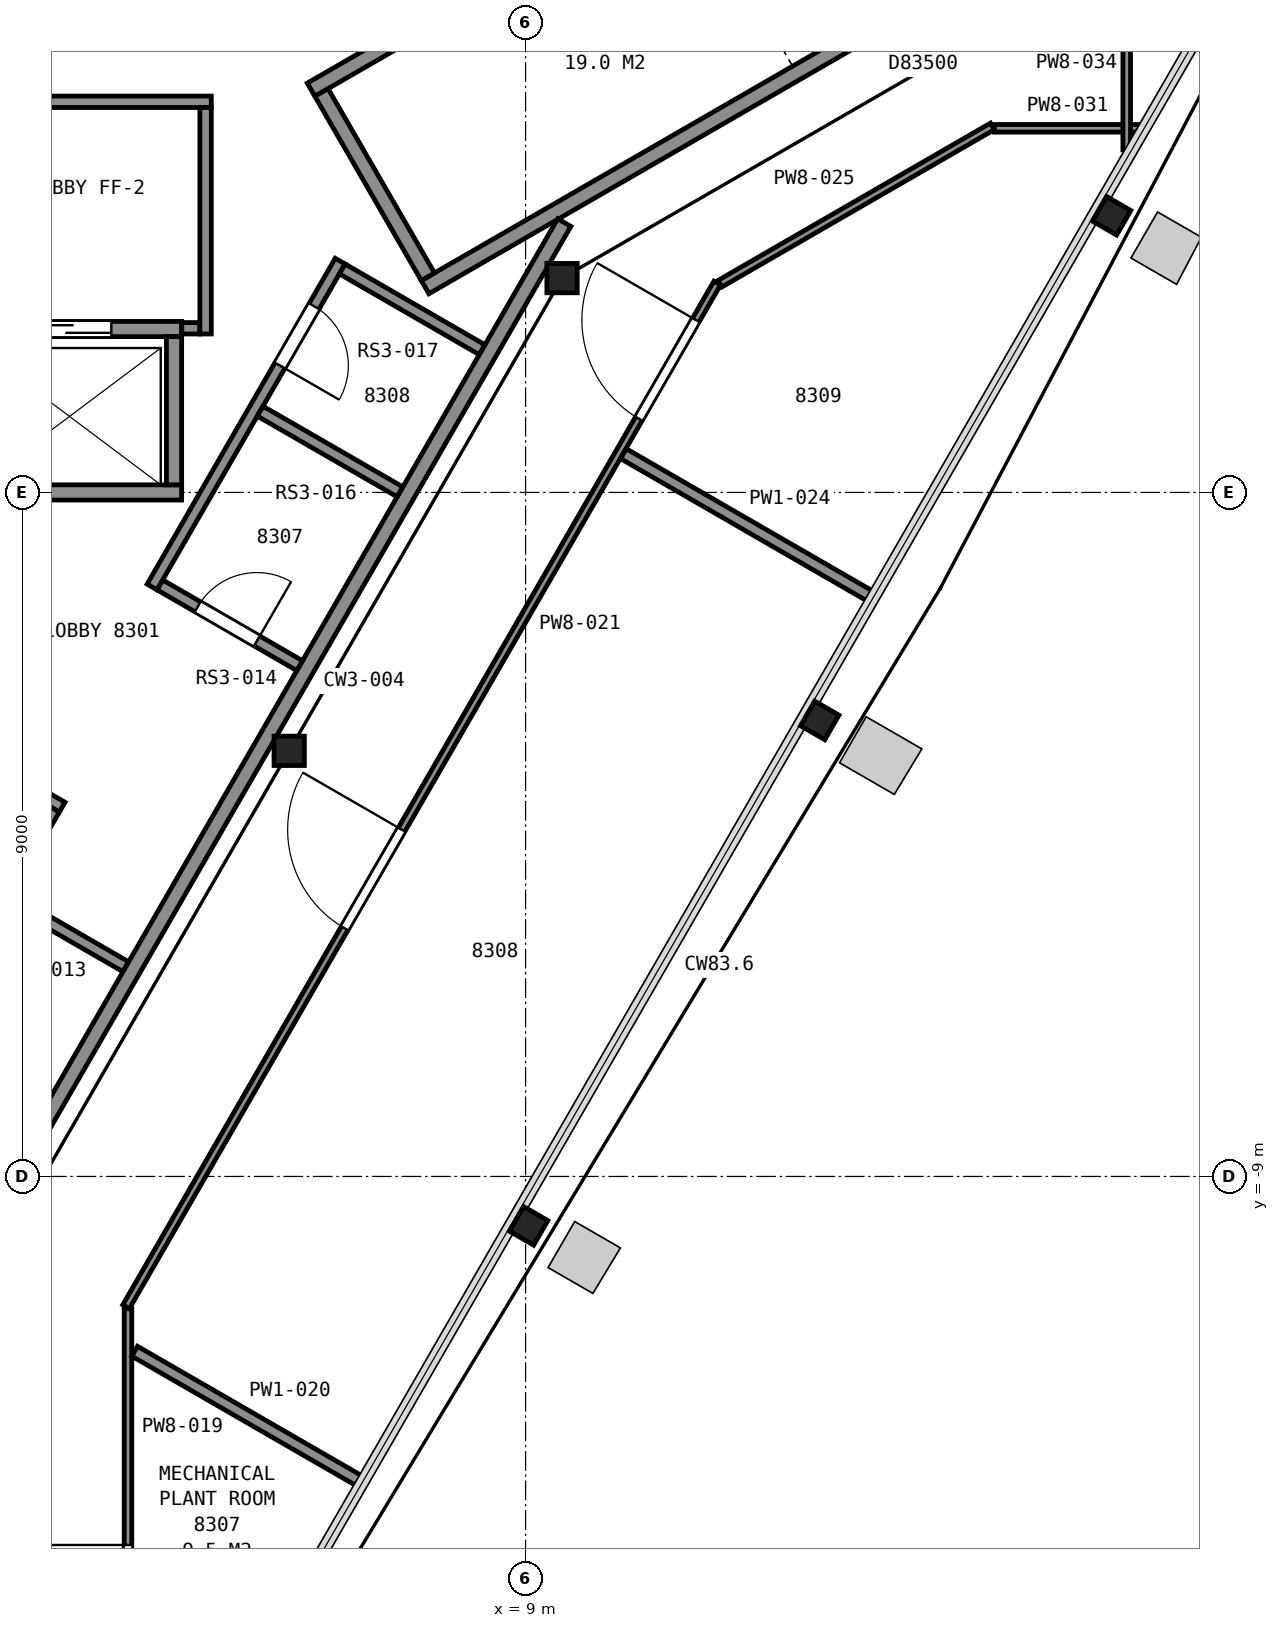
"""IFC4 building model, lengths in metres.
Left out: names, types, materials, properties, quantities, classifications, styles, units other than length and angle.
Written with IfcOpenShell. Run it as: python <this file> out.ifc"""

import sys

from ifc_helpers import new_model, si_unit, direction, frame, frame_2d, origin, origin_2d, place, context, subcontext, project, spatial, rectangle, i_section, extrude, element, fill, save


model = new_model("IFC4")
c1 = context("Model", 3, precision=1e-05, world=origin(), true_north=direction((0.0, 1.0)))
c2 = subcontext(c1, "Body", "Model", "MODEL_VIEW")
j1 = project(units=[si_unit("LENGTHUNIT", "METRE"), si_unit("PLANEANGLEUNIT", "RADIAN")], contexts=[c1])
p1 = place(None, origin())
s1 = spatial("IfcSite", under=j1, at=p1, CompositionType="ELEMENT")
p2 = place(p1, origin())
s2 = spatial("IfcBuilding", under=s1, at=p2, CompositionType="ELEMENT")
p3 = place(p2, frame((0.0, 0.0, 329.4)))
s3 = spatial("IfcBuildingStorey", under=s2, at=p3, CompositionType="ELEMENT", Elevation=329.4)
p4 = place(p3, frame((9.04, -9.65, 0.0), z_axis=(0.0, 0.0, 1.0), x_axis=(-0.5, -0.866025403784, 0.0)))
e1 = element("IfcColumn", 1, at=p4, inside=s3, PredefinedType="COLUMN", context=c2, shape_type="SweptSolid", body=[
    extrude(i_section(OverallWidth=0.373, OverallDepth=0.368, WebThickness=0.015, FlangeThickness=0.024, FilletRadius=0.015, at=origin_2d()), origin(), (0.0, 0.0, 1.0), 4.36),
])
p5 = place(p3, frame((12.87, -3.0, 0.0), z_axis=(0.0, 0.0, 1.0), x_axis=(-0.5, -0.866025403784, 0.0)))
e2 = element("IfcColumn", 2, at=p5, inside=s3, PredefinedType="COLUMN", context=c2, shape_type="SweptSolid", body=[
    extrude(i_section(OverallWidth=0.373, OverallDepth=0.368, WebThickness=0.015, FlangeThickness=0.024, FilletRadius=0.015, at=origin_2d()), origin(), (0.0, 0.0, 1.0), 4.6),
])
p6 = place(p3, frame((16.71, 3.64, 0.0), z_axis=(0.0, 0.0, 1.0), x_axis=(-0.5, -0.866025403784, 0.0)))
e3 = element("IfcColumn", 3, at=p6, inside=s3, PredefinedType="COLUMN", context=c2, shape_type="SweptSolid", body=[
    extrude(i_section(OverallWidth=0.373, OverallDepth=0.368, WebThickness=0.015, FlangeThickness=0.024, FilletRadius=0.015, at=origin_2d()), origin(), (0.0, 0.0, 1.0), 4.34),
])
for number, where, z_axis, x_axis in (
    (4, (9.48, 2.82, 0.0), (0.0, 0.0, 1.0), (1.0, 0.0, 0.0)),
    (5, (5.89, -3.4, 0.0), (0.0, 0.0, 1.0), (1.0, 0.0, 0.0)),
):
    element("IfcColumn", number, at=place(p3, frame(where, z_axis=z_axis, x_axis=x_axis)), inside=s3, PredefinedType="COLUMN", context=c2, shape_type="SweptSolid", body=[
        extrude(i_section(OverallWidth=0.399, OverallDepth=0.386, WebThickness=0.021, FlangeThickness=0.033, FilletRadius=0.015, at=origin_2d()), origin(), (0.0, 0.0, 1.0), 4.2),
    ])
for number, where, z_axis, x_axis in (
    (6, (6.178, 5.299, 0.0), (0.0, 0.0, 1.0), (0.866, 0.5, 0.0)),
    (7, (7.678, 2.701, 0.0), (0.0, 0.0, 1.0), (0.866, 0.5, 0.0)),
):
    element("IfcWall", number, at=place(p3, frame(where, z_axis=z_axis, x_axis=x_axis)), inside=s3, PredefinedType="PARTITIONING", context=c2, shape_type="SweptSolid", body=[
        extrude(rectangle(XDim=7.2, YDim=0.2, at=frame_2d((3.6, 0.0))), origin(), (0.0, 0.0, 1.0), 4.2),
    ])
p7 = place(p3, frame((7.715, 2.838, 0.0), z_axis=(0.0, 0.0, 1.0), x_axis=(-0.500049511043, 0.865996816683, 0.0)))
e8 = element("IfcWall", 8, at=p7, inside=s3, PredefinedType="PARTITIONING", context=c2, shape_type="SweptSolid", body=[
    extrude(rectangle(XDim=2.8, YDim=0.2, at=frame_2d((1.4, 0.0))), origin(), (0.0, 0.0, 1.0), 4.2),
])
p8 = place(p3, frame((1.525, 0.0, 0.0), z_axis=(0.0, 0.0, 1.0), x_axis=(1.0, 0.0, 0.0)))
e9 = element("IfcWall", 9, at=p8, inside=s3, PredefinedType="PARTITIONING", context=c2, shape_type="SweptSolid", body=[
    extrude(rectangle(XDim=2.95, YDim=0.2, at=frame_2d((1.475, 0.0))), origin(), (0.0, 0.0, 1.0), 4.2),
])
p9 = place(p3, frame((1.525, 2.15, 0.0), z_axis=(0.0, 0.0, 1.0), x_axis=(1.0, 0.0, 0.0)))
e10 = element("IfcWall", 10, at=p9, inside=s3, PredefinedType="PARTITIONING", context=c2, shape_type="SweptSolid", body=[
    extrude(rectangle(XDim=2.95, YDim=0.2, at=frame_2d((1.475, 0.0))), origin(), (0.0, 0.0, 1.0), 4.2),
])
p10 = place(p9, frame((0.925, 0.0, 0.0)))
e11 = element("IfcOpeningElement", 11, at=p10, cuts=e10, PredefinedType="OPENING", context=c2, shape_type="SweptSolid", body=[
    extrude(rectangle(XDim=1.1, YDim=2.1, at=frame_2d((0.55, 1.05))), frame((0.0, 0.11, 0.0), z_axis=(0.0, -1.0, 0.0), x_axis=(1.0, 0.0, 0.0)), (0.0, 0.0, 1.0), 0.22),
])
p11 = place(p3, frame((4.375, 0.1, 0.0), z_axis=(0.0, 0.0, 1.0), x_axis=(0.0, 1.0, 0.0)))
e12 = element("IfcWall", 12, at=p11, inside=s3, PredefinedType="PARTITIONING", context=c2, shape_type="SweptSolid", body=[
    extrude(rectangle(XDim=1.95, YDim=0.2, at=frame_2d((0.975, 0.0))), origin(), (0.0, 0.0, 1.0), 4.2),
])
p12 = place(p3, frame((-0.245, 5.14, 0.0), z_axis=(0.0, 0.0, 1.0), x_axis=(1.0, 0.0, 0.0)))
e13 = element("IfcWall", 13, at=p12, inside=s3, PredefinedType="PARTITIONING", context=c2, shape_type="SweptSolid", body=[
    extrude(rectangle(XDim=5.11, YDim=0.15, at=frame_2d((2.555, 0.0))), origin(), (0.0, 0.0, 1.0), 3.9),
])
p13 = place(p12, frame((1.975, 0.0, 0.0)))
e14 = element("IfcOpeningElement", 14, at=p13, cuts=e13, PredefinedType="OPENING", context=c2, shape_type="SweptSolid", body=[
    extrude(rectangle(XDim=1.0, YDim=2.1, at=frame_2d((0.5, 1.05))), frame((0.0, 0.085, 0.0), z_axis=(0.0, -1.0, 0.0), x_axis=(1.0, 0.0, 0.0)), (0.0, 0.0, 1.0), 0.17),
])
p14 = place(p3, frame((1.344, -3.241, 0.0), z_axis=(0.0, 0.0, 1.0), x_axis=(0.865989075817, -0.500062916607, 0.0)))
e15 = element("IfcWall", 15, at=p14, inside=s3, PredefinedType="PARTITIONING", context=c2, shape_type="SweptSolid", body=[
    extrude(rectangle(XDim=1.8, YDim=0.15, at=frame_2d((0.9, 0.0))), origin(), (0.0, 0.0, 1.0), 3.9),
])
p15 = place(p3, frame((2.176, -5.251, 0.0), z_axis=(0.0, 0.0, 1.0), x_axis=(0.500173430036, 0.86592525075, 0.0)))
e16 = element("IfcWall", 16, at=p15, inside=s3, PredefinedType="PARTITIONING", context=c2, shape_type="SweptSolid", body=[
    extrude(rectangle(XDim=1.25, YDim=0.15, at=frame_2d((0.625, 0.0))), origin(), (0.0, 0.0, 1.0), 3.9),
])
p16 = place(p3, frame((2.073, -5.279, 0.0), z_axis=(0.0, 0.0, 1.0), x_axis=(0.86609690551, -0.499876134923, 0.0)))
e17 = element("IfcWall", 17, at=p16, inside=s3, PredefinedType="PARTITIONING", context=c2, shape_type="SweptSolid", body=[
    extrude(rectangle(XDim=1.925, YDim=0.15, at=frame_2d((0.963, 0.0))), origin(), (0.0, 0.0, 1.0), 3.9),
])
p17 = place(p3, frame((2.552, -8.5, 0.0), z_axis=(0.0, 0.0, 1.0), x_axis=(0.499981156672, 0.866036282712, 0.0)))
e18 = element("IfcWall", 18, at=p17, inside=s3, PredefinedType="PARTITIONING", context=c2, shape_type="SweptSolid", body=[
    extrude(rectangle(XDim=13.915, YDim=0.2, at=frame_2d((6.957, 0.0))), origin(), (0.0, 0.0, 1.0), 3.9),
])
p18 = place(p3, frame((4.188, -1.217, 0.0), z_axis=(0.0, 0.0, 1.0), x_axis=(0.865913749133, -0.500193341681, 0.0)))
e19 = element("IfcWall", 19, at=p18, inside=s3, PredefinedType="PARTITIONING", context=c2, shape_type="SweptSolid", body=[
    extrude(rectangle(XDim=2.124, YDim=0.15, at=frame_2d((1.062, 0.0))), origin(), (0.0, 0.0, 1.0), 3.9),
])
p19 = place(p18, frame((0.575, 0.0, 0.0)))
e20 = element("IfcOpeningElement", 20, at=p19, cuts=e19, PredefinedType="OPENING", context=c2, shape_type="SweptSolid", body=[
    extrude(rectangle(XDim=0.9, YDim=2.1, at=frame_2d((0.45, 1.05))), frame((0.0, 0.085, 0.0), z_axis=(0.0, -1.0, 0.0), x_axis=(1.0, 0.0, 0.0)), (0.0, 0.0, 1.0), 0.17),
])
p20 = place(p3, frame((6.561, 3.043, 0.0), z_axis=(0.0, 0.0, 1.0), x_axis=(-0.500011342071, -0.866018855338, 0.0)))
e21 = element("IfcWall", 21, at=p20, inside=s3, PredefinedType="PARTITIONING", context=c2, shape_type="SweptSolid", body=[
    extrude(rectangle(XDim=4.95, YDim=0.15, at=frame_2d((2.475, 0.0))), origin(), (0.0, 0.0, 1.0), 3.9),
])
p21 = place(p20, frame((0.685, 0.0, 0.0)))
e22 = element("IfcOpeningElement", 22, at=p21, cuts=e21, PredefinedType="OPENING", context=c2, shape_type="SweptSolid", body=[
    extrude(rectangle(XDim=0.9, YDim=2.1, at=frame_2d((0.45, 1.05))), frame((0.0, 0.085, 0.0), z_axis=(0.0, -1.0, 0.0), x_axis=(1.0, 0.0, 0.0)), (0.0, 0.0, 1.0), 0.17),
])
p22 = place(p3, frame((4.477, 2.16, 0.0), z_axis=(0.0, 0.0, 1.0), x_axis=(1.0, 0.0, 0.0)))
e23 = element("IfcWall", 23, at=p22, inside=s3, PredefinedType="PARTITIONING", context=c2, shape_type="SweptSolid", body=[
    extrude(rectangle(XDim=0.238, YDim=0.15, at=frame_2d((0.119, 0.0))), origin(), (0.0, 0.0, 1.0), 3.9),
])
p23 = place(p3, frame((4.79, 2.085, 0.0), z_axis=(0.0, 0.0, 1.0), x_axis=(0.0, 1.0, 0.0)))
e24 = element("IfcWall", 24, at=p23, inside=s3, PredefinedType="PARTITIONING", context=c2, shape_type="SweptSolid", body=[
    extrude(rectangle(XDim=2.98, YDim=0.15, at=frame_2d((1.49, 0.0))), origin(), (0.0, 0.0, 1.0), 3.9),
])
p24 = place(p3, frame((5.508, 1.07, 0.0), z_axis=(0.0, 0.0, 1.0), x_axis=(0.86611284933, -0.499848509276, 0.0)))
e25 = element("IfcWall", 25, at=p24, inside=s3, PredefinedType="PARTITIONING", context=c2, shape_type="SweptSolid", body=[
    extrude(rectangle(XDim=2.124, YDim=0.15, at=frame_2d((1.062, 0.0))), origin(), (0.0, 0.0, 1.0), 3.9),
])
p25 = place(p3, frame((6.588, 2.94, 0.0), z_axis=(0.0, 0.0, 1.0), x_axis=(0.8659425006, -0.500143565044, 0.0)))
e26 = element("IfcWall", 26, at=p25, inside=s3, PredefinedType="PARTITIONING", context=c2, shape_type="SweptSolid", body=[
    extrude(rectangle(XDim=2.125, YDim=0.15, at=frame_2d((1.062, 0.0))), origin(), (0.0, 0.0, 1.0), 3.9),
])
p26 = place(p3, frame((3.769, -10.741, 0.0), z_axis=(0.0, 0.0, 1.0), x_axis=(0.0, -1.0, 0.0)))
e27 = element("IfcWall", 27, at=p26, inside=s3, PredefinedType="PARTITIONING", context=c2, shape_type="SweptSolid", body=[
    extrude(rectangle(XDim=7.512, YDim=0.1, at=frame_2d((3.756, 0.0))), origin(), (0.0, 0.0, 1.0), 3.297),
])
p27 = place(p26, frame((3.108, 0.0, 0.0)))
e28 = element("IfcOpeningElement", 28, at=p27, cuts=e27, PredefinedType="OPENING", context=c2, shape_type="SweptSolid", body=[
    extrude(rectangle(XDim=1.5, YDim=2.1, at=frame_2d((0.75, 1.05))), frame((0.0, 0.06, 0.0), z_axis=(0.0, -1.0, 0.0), x_axis=(1.0, 0.0, 0.0)), (0.0, 0.0, 1.0), 0.12),
])
p28 = place(p3, frame((3.856, -11.3, 0.0), z_axis=(0.0, 0.0, 1.0), x_axis=(0.866084061191, -0.499898388626, 0.0)))
e29 = element("IfcWall", 29, at=p28, inside=s3, PredefinedType="PARTITIONING", context=c2, shape_type="SweptSolid", body=[
    extrude(rectangle(XDim=3.444, YDim=0.15, at=frame_2d((1.722, 0.0))), origin(), (0.0, 0.0, 1.0), 3.297),
])
p29 = place(p3, frame((11.521, 2.754, 0.0), z_axis=(0.0, 0.0, 1.0), x_axis=(-0.500044034969, -0.86599997869, 0.0)))
e30 = element("IfcWall", 30, at=p29, inside=s3, PredefinedType="PARTITIONING", context=c2, shape_type="SweptSolid", body=[
    extrude(rectangle(XDim=15.553, YDim=0.1, at=frame_2d((7.776, 0.0))), origin(), (0.0, 0.0, 1.0), 3.297),
])
p30 = place(p29, frame((8.303, 0.0, 0.0)))
e31 = element("IfcOpeningElement", 31, at=p30, cuts=e30, PredefinedType="OPENING", context=c2, shape_type="SweptSolid", body=[
    extrude(rectangle(XDim=1.5, YDim=2.1, at=frame_2d((0.75, 1.05))), frame((0.0, 0.06, 0.0), z_axis=(0.0, -1.0, 0.0), x_axis=(1.0, 0.0, 0.0)), (0.0, 0.0, 1.0), 0.12),
])
p31 = place(p29, frame((0.561, 0.0, 0.0)))
e32 = element("IfcOpeningElement", 32, at=p31, cuts=e30, PredefinedType="OPENING", context=c2, shape_type="SweptSolid", body=[
    extrude(rectangle(XDim=1.5, YDim=2.1, at=frame_2d((0.75, 1.05))), frame((0.0, 0.06, 0.0), z_axis=(0.0, -1.0, 0.0), x_axis=(1.0, 0.0, 0.0)), (0.0, 0.0, 1.0), 0.12),
])
p32 = place(p3, frame((10.288, 0.51, 0.0), z_axis=(0.0, 0.0, 1.0), x_axis=(0.865987581393, -0.500065504582, 0.0)))
e33 = element("IfcWall", 33, at=p32, inside=s3, PredefinedType="PARTITIONING", context=c2, shape_type="SweptSolid", body=[
    extrude(rectangle(XDim=3.778, YDim=0.15, at=frame_2d((1.889, 0.0))), origin(), (0.0, 0.0, 1.0), 3.297),
])
p33 = place(p3, frame((11.557, 2.746, 0.0), z_axis=(0.0, 0.0, 1.0), x_axis=(0.866005840187, 0.500033883614, 0.0)))
e34 = element("IfcWall", 34, at=p33, inside=s3, PredefinedType="PARTITIONING", context=c2, shape_type="SweptSolid", body=[
    extrude(rectangle(XDim=4.139, YDim=0.1, at=frame_2d((2.07, 0.0))), origin(), (0.0, 0.0, 1.0), 3.297),
])
p34 = place(p3, frame((15.168, 4.791, 0.0), z_axis=(0.0, 0.0, 1.0), x_axis=(1.0, 0.0, 0.0)))
e35 = element("IfcWall", 35, at=p34, inside=s3, PredefinedType="PARTITIONING", context=c2, shape_type="SweptSolid", body=[
    extrude(rectangle(XDim=1.926, YDim=0.1, at=frame_2d((0.963, 0.0))), origin(), (0.0, 0.0, 1.0), 3.297),
])
p35 = place(p3, frame((16.909, 7.779, 0.0), z_axis=(0.0, 0.0, 1.0), x_axis=(0.0, -1.0, 0.0)))
e36 = element("IfcWall", 36, at=p35, inside=s3, PredefinedType="PARTITIONING", context=c2, shape_type="SweptSolid", body=[
    extrude(rectangle(XDim=3.272, YDim=0.1, at=frame_2d((1.636, 0.0))), origin(), (0.0, 0.0, 1.0), 3.297),
])
p36 = place(p35, frame((0.318, 0.0, 0.0)))
e37 = element("IfcOpeningElement", 37, at=p36, cuts=e36, PredefinedType="OPENING", context=c2, shape_type="SweptSolid", body=[
    extrude(rectangle(XDim=1.0, YDim=2.1, at=frame_2d((0.5, 1.05))), frame((0.0, 0.06, 0.0), z_axis=(0.0, -1.0, 0.0), x_axis=(1.0, 0.0, 0.0)), (0.0, 0.0, 1.0), 0.12),
])
p37 = place(p10, origin())
e38 = element("IfcDoor", 38, at=p37, inside=s3, OperationType="SLIDING_TO_RIGHT", PredefinedType="DOOR", context=c2, shape_type="SweptSolid", body=[
    extrude(rectangle(XDim=1.1, YDim=2.1, at=frame_2d((0.55, 1.05))), frame((0.0, 0.025, 0.0), z_axis=(0.0, -1.0, 0.0), x_axis=(1.0, 0.0, 0.0)), (0.0, 0.0, 1.0), 0.05),
])
fill(e11, e38)
p38 = place(p19, origin())
e39 = element("IfcDoor", 39, at=p38, inside=s3, OperationType="SINGLE_SWING_RIGHT", PredefinedType="DOOR", context=c2, shape_type="SweptSolid", body=[
    extrude(rectangle(XDim=0.9, YDim=2.1, at=frame_2d((0.45, 1.05))), frame((0.0, 0.025, 0.0), z_axis=(0.0, -1.0, 0.0), x_axis=(1.0, 0.0, 0.0)), (0.0, 0.0, 1.0), 0.05),
])
fill(e20, e39)
p39 = place(p21, origin())
e40 = element("IfcDoor", 40, at=p39, inside=s3, OperationType="SINGLE_SWING_RIGHT", PredefinedType="DOOR", context=c2, shape_type="SweptSolid", body=[
    extrude(rectangle(XDim=0.9, YDim=2.1, at=frame_2d((0.45, 1.05))), frame((0.0, 0.025, 0.0), z_axis=(0.0, -1.0, 0.0), x_axis=(1.0, 0.0, 0.0)), (0.0, 0.0, 1.0), 0.05),
])
fill(e22, e40)
p40 = place(p27, origin())
e41 = element("IfcDoor", 41, at=p40, inside=s3, OperationType="DOUBLE_DOOR_SINGLE_SWING", PredefinedType="DOOR", context=c2, shape_type="SweptSolid", body=[
    extrude(rectangle(XDim=1.5, YDim=2.1, at=frame_2d((0.75, 1.05))), frame((0.0, 0.025, 0.0), z_axis=(0.0, -1.0, 0.0), x_axis=(1.0, 0.0, 0.0)), (0.0, 0.0, 1.0), 0.05),
])
fill(e28, e41)
p41 = place(p30, origin())
e42 = element("IfcDoor", 42, at=p41, inside=s3, OperationType="DOUBLE_DOOR_SINGLE_SWING", PredefinedType="DOOR", context=c2, shape_type="SweptSolid", body=[
    extrude(rectangle(XDim=1.5, YDim=2.1, at=frame_2d((0.75, 1.05))), frame((0.0, 0.025, 0.0), z_axis=(0.0, -1.0, 0.0), x_axis=(1.0, 0.0, 0.0)), (0.0, 0.0, 1.0), 0.05),
])
fill(e31, e42)
p42 = place(p31, origin())
e43 = element("IfcDoor", 43, at=p42, inside=s3, OperationType="DOUBLE_DOOR_SINGLE_SWING", PredefinedType="DOOR", context=c2, shape_type="SweptSolid", body=[
    extrude(rectangle(XDim=1.5, YDim=2.1, at=frame_2d((0.75, 1.05))), frame((0.0, 0.025, 0.0), z_axis=(0.0, -1.0, 0.0), x_axis=(1.0, 0.0, 0.0)), (0.0, 0.0, 1.0), 0.05),
])
fill(e32, e43)
save(model, sys.argv[1])
